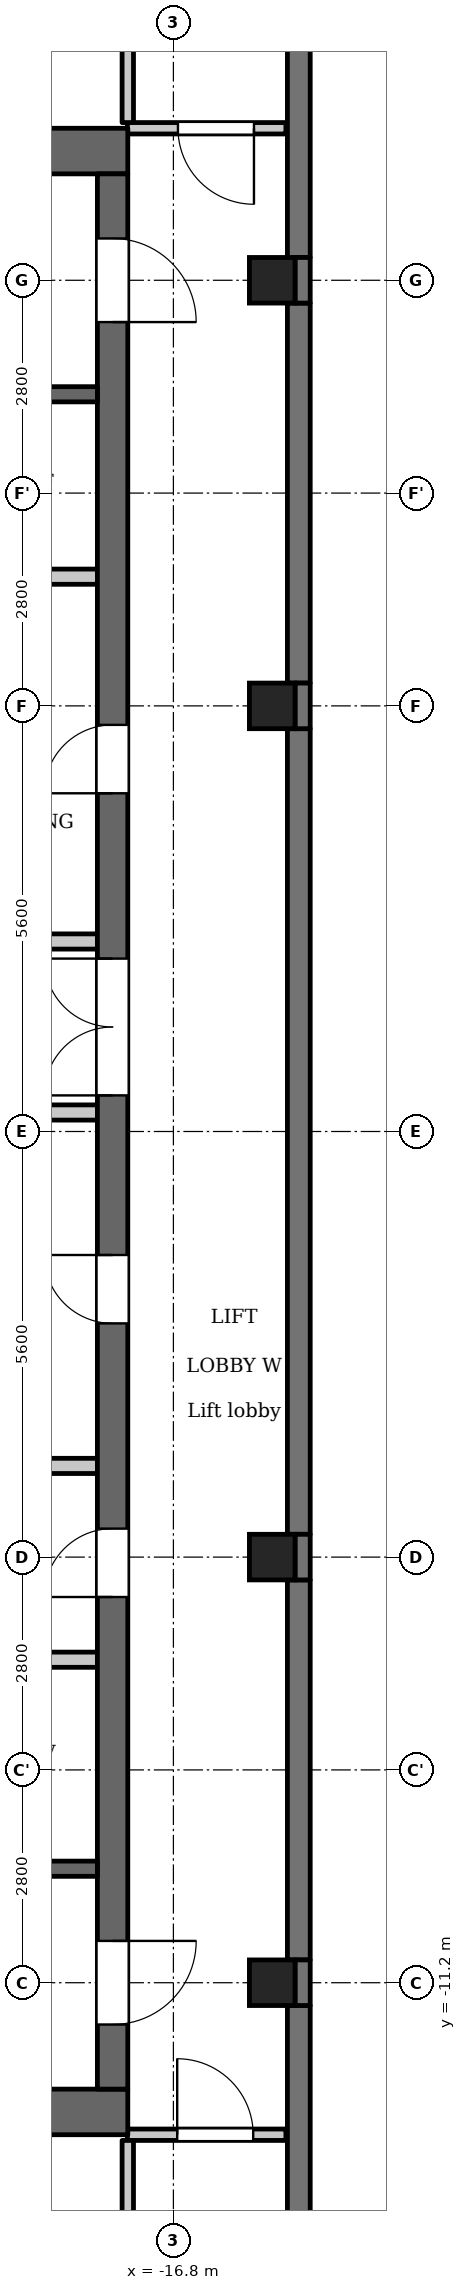
"""IFC4 building model, lengths in metres.
Left out: names, types, materials, properties, quantities, classifications, styles, units other than length and angle.
Written with IfcOpenShell. Run it as: python <this file> out.ifc"""

import sys

from ifc_helpers import new_model, si_unit, direction, frame, frame_2d, origin, origin_2d, place, context, subcontext, project, spatial, polyline, rectangle, outline, extrude, element, fill, save


model = new_model("IFC4")
c1 = context("Model", 3, precision=1e-05, world=origin(), true_north=direction((0.0, 1.0)))
c2 = subcontext(c1, "Body", "Model", "MODEL_VIEW")
j1 = project(units=[si_unit("LENGTHUNIT", "METRE"), si_unit("PLANEANGLEUNIT", "RADIAN")], contexts=[c1])
p1 = place(None, origin())
s1 = spatial("IfcSite", under=j1, at=p1, CompositionType="ELEMENT")
p2 = place(p1, origin())
s2 = spatial("IfcBuilding", under=s1, at=p2, CompositionType="ELEMENT")
p3 = place(p2, frame((0.0, 0.0, 310.4)))
s3 = spatial("IfcBuildingStorey", under=s2, at=p3, CompositionType="ELEMENT", Elevation=310.4)
for number, where, z_axis, x_axis in (
    (1, (-15.5, -11.2, 0.0), (0.0, 0.0, 1.0), (1.0, 0.0, 0.0)),
    (2, (-15.5, -5.6, 0.0), (0.0, 0.0, 1.0), (1.0, 0.0, 0.0)),
    (3, (-15.5, 5.6, 0.0), (0.0, 0.0, 1.0), (1.0, 0.0, 0.0)),
    (4, (-15.5, 11.2, 0.0), (0.0, 0.0, 1.0), (1.0, 0.0, 0.0)),
):
    element("IfcColumn", number, at=place(p3, frame(where, z_axis=z_axis, x_axis=x_axis)), inside=s3, PredefinedType="COLUMN", context=c2, shape_type="SweptSolid", body=[
        extrude(rectangle(XDim=0.6, YDim=0.6, at=origin_2d()), origin(), (0.0, 0.0, 1.0), 3.5),
    ])
p4 = place(p3, frame((-15.15, -18.8, 0.0), z_axis=(0.0, 0.0, 1.0), x_axis=(0.0, 1.0, 0.0)))
e5 = element("IfcWall", 5, at=p4, inside=s3, PredefinedType="SOLIDWALL", context=c2, shape_type="SweptSolid", body=[
    extrude(rectangle(XDim=7.3, YDim=0.3, at=frame_2d((3.65, 0.0))), origin(), (0.0, 0.0, 1.0), 2.8),
])
p5 = place(p4, frame((1.863, 0.0, 0.9)))
e6 = element("IfcOpeningElement", 6, at=p5, cuts=e5, PredefinedType="OPENING", context=c2, shape_type="SweptSolid", body=[
    extrude(rectangle(XDim=1.8, YDim=1.25, at=frame_2d((0.9, 0.625))), frame((0.0, 0.16, 0.0), z_axis=(0.0, -1.0, 0.0), x_axis=(1.0, 0.0, 0.0)), (0.0, 0.0, 1.0), 0.32),
])
p6 = place(p3, frame((-15.15, -10.9, 0.0), z_axis=(0.0, 0.0, 1.0), x_axis=(0.0, 1.0, 0.0)))
e7 = element("IfcWall", 7, at=p6, inside=s3, PredefinedType="SOLIDWALL", context=c2, shape_type="SweptSolid", body=[
    extrude(rectangle(XDim=5.0, YDim=0.3, at=frame_2d((2.5, 0.0))), origin(), (0.0, 0.0, 1.0), 2.8),
])
p7 = place(p3, frame((-15.15, -5.3, 0.0), z_axis=(0.0, 0.0, 1.0), x_axis=(0.0, 1.0, 0.0)))
e8 = element("IfcWall", 8, at=p7, inside=s3, PredefinedType="SOLIDWALL", context=c2, shape_type="SweptSolid", body=[
    extrude(rectangle(XDim=10.6, YDim=0.3, at=frame_2d((5.3, 0.0))), origin(), (0.0, 0.0, 1.0), 2.8),
])
p8 = place(p3, frame((-15.15, 5.9, 0.0), z_axis=(0.0, 0.0, 1.0), x_axis=(0.0, 1.0, 0.0)))
e9 = element("IfcWall", 9, at=p8, inside=s3, PredefinedType="SOLIDWALL", context=c2, shape_type="SweptSolid", body=[
    extrude(rectangle(XDim=5.0, YDim=0.3, at=frame_2d((2.5, 0.0))), origin(), (0.0, 0.0, 1.0), 2.8),
])
p9 = place(p3, frame((-15.15, 11.5, 0.0), z_axis=(0.0, 0.0, 1.0), x_axis=(0.0, 1.0, 0.0)))
e10 = element("IfcWall", 10, at=p9, inside=s3, PredefinedType="SOLIDWALL", context=c2, shape_type="SweptSolid", body=[
    extrude(rectangle(XDim=7.3, YDim=0.3, at=frame_2d((3.65, 0.0))), origin(), (0.0, 0.0, 1.0), 2.8),
])
p10 = place(p9, frame((3.637, 0.0, 0.9)))
e11 = element("IfcOpeningElement", 11, at=p10, cuts=e10, PredefinedType="OPENING", context=c2, shape_type="SweptSolid", body=[
    extrude(rectangle(XDim=1.8, YDim=1.25, at=frame_2d((0.9, 0.625))), frame((0.0, 0.16, 0.0), z_axis=(0.0, -1.0, 0.0), x_axis=(1.0, 0.0, 0.0)), (0.0, 0.0, 1.0), 0.32),
])
for number, where, z_axis, x_axis in (
    (12, (-17.4, 12.9, 0.0), (0.0, 0.0, 1.0), (-1.0, 0.0, 0.0)),
    (13, (-17.4, -12.9, 0.0), (0.0, 0.0, 1.0), (-1.0, 0.0, 0.0)),
):
    element("IfcWall", number, at=place(p3, frame(where, z_axis=z_axis, x_axis=x_axis)), inside=s3, PredefinedType="SHEAR", context=c2, shape_type="SweptSolid", body=[
        extrude(rectangle(XDim=7.6, YDim=0.6, at=frame_2d((3.8, 0.0))), origin(), (0.0, 0.0, 1.0), 2.8),
    ])
p11 = place(p3, frame((-17.8, -4.4, 0.0), z_axis=(0.0, 0.0, 1.0), x_axis=(-1.0, 0.0, 0.0)))
e14 = element("IfcWall", 14, at=p11, inside=s3, PredefinedType="PARTITIONING", context=c2, shape_type="SweptSolid", body=[
    extrude(rectangle(XDim=2.8, YDim=0.2, at=frame_2d((1.4, 0.0))), origin(), (0.0, 0.0, 1.0), 2.8),
])
p12 = place(p3, frame((-17.6, -12.6, 0.0), z_axis=(0.0, 0.0, 1.0), x_axis=(0.0, 1.0, 0.0)))
e15 = element("IfcWall", 15, at=p12, inside=s3, PredefinedType="SHEAR", context=c2, shape_type="SweptSolid", body=[
    extrude(rectangle(XDim=25.2, YDim=0.4, at=frame_2d((12.6, 0.0))), origin(), (0.0, 0.0, 1.0), 2.8),
])
p13 = place(p12, frame((6.475, 0.0, 0.0)))
e16 = element("IfcOpeningElement", 16, at=p13, cuts=e15, PredefinedType="OPENING", context=c2, shape_type="SweptSolid", body=[
    extrude(rectangle(XDim=0.9, YDim=2.1, at=frame_2d((0.45, 1.05))), frame((0.0, 0.21, 0.0), z_axis=(0.0, -1.0, 0.0), x_axis=(1.0, 0.0, 0.0)), (0.0, 0.0, 1.0), 0.42),
])
p14 = place(p12, frame((10.075, 0.0, 0.0)))
e17 = element("IfcOpeningElement", 17, at=p14, cuts=e15, PredefinedType="OPENING", context=c2, shape_type="SweptSolid", body=[
    extrude(rectangle(XDim=0.9, YDim=2.1, at=frame_2d((0.45, 1.05))), frame((0.0, 0.21, 0.0), z_axis=(0.0, -1.0, 0.0), x_axis=(1.0, 0.0, 0.0)), (0.0, 0.0, 1.0), 0.42),
])
p15 = place(p12, frame((17.05, 0.0, 0.0)))
e18 = element("IfcOpeningElement", 18, at=p15, cuts=e15, PredefinedType="OPENING", context=c2, shape_type="SweptSolid", body=[
    extrude(rectangle(XDim=0.9, YDim=2.1, at=frame_2d((0.45, 1.05))), frame((0.0, 0.21, 0.0), z_axis=(0.0, -1.0, 0.0), x_axis=(1.0, 0.0, 0.0)), (0.0, 0.0, 1.0), 0.42),
])
p16 = place(p12, frame((23.25, 0.0, 0.0)))
e19 = element("IfcOpeningElement", 19, at=p16, cuts=e15, PredefinedType="OPENING", context=c2, shape_type="SweptSolid", body=[
    extrude(rectangle(XDim=1.1, YDim=2.1, at=frame_2d((0.55, 1.05))), frame((0.0, 0.21, 0.0), z_axis=(0.0, -1.0, 0.0), x_axis=(1.0, 0.0, 0.0)), (0.0, 0.0, 1.0), 0.42),
])
p17 = place(p12, frame((0.85, 0.0, 0.0)))
e20 = element("IfcOpeningElement", 20, at=p17, cuts=e15, PredefinedType="OPENING", context=c2, shape_type="SweptSolid", body=[
    extrude(rectangle(XDim=1.1, YDim=2.1, at=frame_2d((0.55, 1.05))), frame((0.0, 0.21, 0.0), z_axis=(0.0, -1.0, 0.0), x_axis=(1.0, 0.0, 0.0)), (0.0, 0.0, 1.0), 0.42),
])
p18 = place(p12, frame((13.075, 0.0, 0.0)))
e21 = element("IfcOpeningElement", 21, at=p18, cuts=e15, PredefinedType="OPENING", context=c2, shape_type="SweptSolid", body=[
    extrude(rectangle(XDim=1.8, YDim=2.1, at=frame_2d((0.9, 1.05))), frame((0.0, 0.21, 0.0), z_axis=(0.0, -1.0, 0.0), x_axis=(1.0, 0.0, 0.0)), (0.0, 0.0, 1.0), 0.42),
])
p19 = place(p3, frame((-17.8, -9.7, 0.0), z_axis=(0.0, 0.0, 1.0), x_axis=(-1.0, 0.0, 0.0)))
e22 = element("IfcWall", 22, at=p19, inside=s3, PredefinedType="SHEAR", context=c2, shape_type="SweptSolid", body=[
    extrude(rectangle(XDim=5.8, YDim=0.2, at=frame_2d((2.9, 0.0))), origin(), (0.0, 0.0, 1.0), 2.8),
])
p20 = place(p19, frame((0.85, 0.0, 0.0)))
e23 = element("IfcOpeningElement", 23, at=p20, cuts=e22, PredefinedType="OPENING", context=c2, shape_type="SweptSolid", body=[
    extrude(rectangle(XDim=1.1, YDim=2.1, at=frame_2d((0.55, 1.05))), frame((0.0, 0.11, 0.0), z_axis=(0.0, -1.0, 0.0), x_axis=(1.0, 0.0, 0.0)), (0.0, 0.0, 1.0), 0.22),
])
p21 = place(p19, frame((3.75, 0.0, 0.0)))
e24 = element("IfcOpeningElement", 24, at=p21, cuts=e22, PredefinedType="OPENING", context=c2, shape_type="SweptSolid", body=[
    extrude(rectangle(XDim=1.1, YDim=2.1, at=frame_2d((0.55, 1.05))), frame((0.0, 0.11, 0.0), z_axis=(0.0, -1.0, 0.0), x_axis=(1.0, 0.0, 0.0)), (0.0, 0.0, 1.0), 0.22),
])
p22 = place(p3, frame((-17.8, -6.95, 0.0), z_axis=(0.0, 0.0, 1.0), x_axis=(-1.0, 0.0, 0.0)))
e25 = element("IfcWall", 25, at=p22, inside=s3, PredefinedType="PARTITIONING", context=c2, shape_type="SweptSolid", body=[
    extrude(rectangle(XDim=2.8, YDim=0.2, at=frame_2d((1.4, 0.0))), origin(), (0.0, 0.0, 1.0), 2.8),
])
for number, where, z_axis, x_axis in (
    (26, (-17.8, 0.25, 0.0), (0.0, 0.0, 1.0), (-1.0, 0.0, 0.0)),
    (27, (-17.8, 2.5, 0.0), (0.0, 0.0, 1.0), (-1.0, 0.0, 0.0)),
):
    element("IfcWall", number, at=place(p3, frame(where, z_axis=z_axis, x_axis=x_axis)), inside=s3, PredefinedType="PARTITIONING", context=c2, shape_type="SweptSolid", body=[
        extrude(rectangle(XDim=3.0, YDim=0.2, at=frame_2d((1.5, 0.0))), origin(), (0.0, 0.0, 1.0), 2.8),
    ])
p23 = place(p3, frame((-17.8, 7.3, 0.0), z_axis=(0.0, 0.0, 1.0), x_axis=(-1.0, 0.0, 0.0)))
e28 = element("IfcWall", 28, at=p23, inside=s3, PredefinedType="PARTITIONING", context=c2, shape_type="SweptSolid", body=[
    extrude(rectangle(XDim=2.8, YDim=0.2, at=frame_2d((1.4, 0.0))), origin(), (0.0, 0.0, 1.0), 2.8),
])
p24 = place(p3, frame((-17.8, 9.7, 0.0), z_axis=(0.0, 0.0, 1.0), x_axis=(-1.0, 0.0, 0.0)))
e29 = element("IfcWall", 29, at=p24, inside=s3, PredefinedType="SHEAR", context=c2, shape_type="SweptSolid", body=[
    extrude(rectangle(XDim=5.8, YDim=0.2, at=frame_2d((2.9, 0.0))), origin(), (0.0, 0.0, 1.0), 2.8),
])
p25 = place(p24, frame((0.85, 0.0, 0.0)))
e30 = element("IfcOpeningElement", 30, at=p25, cuts=e29, PredefinedType="OPENING", context=c2, shape_type="SweptSolid", body=[
    extrude(rectangle(XDim=1.1, YDim=2.1, at=frame_2d((0.55, 1.05))), frame((0.0, 0.11, 0.0), z_axis=(0.0, -1.0, 0.0), x_axis=(1.0, 0.0, 0.0)), (0.0, 0.0, 1.0), 0.22),
])
p26 = place(p24, frame((3.75, 0.0, 0.0)))
e31 = element("IfcOpeningElement", 31, at=p26, cuts=e29, PredefinedType="OPENING", context=c2, shape_type="SweptSolid", body=[
    extrude(rectangle(XDim=1.1, YDim=2.1, at=frame_2d((0.55, 1.05))), frame((0.0, 0.11, 0.0), z_axis=(0.0, -1.0, 0.0), x_axis=(1.0, 0.0, 0.0)), (0.0, 0.0, 1.0), 0.22),
])
p27 = place(p3, frame((-17.405, -13.2, 0.0), z_axis=(0.0, 0.0, 1.0), x_axis=(1.0, 0.0, 0.0)))
e32 = element("IfcWall", 32, at=p27, inside=s3, PredefinedType="PARTITIONING", context=c2, shape_type="SweptSolid", body=[
    extrude(rectangle(XDim=2.085, YDim=0.15, at=frame_2d((1.042, 0.0))), origin(), (0.0, 0.0, 1.0), 2.8),
])
p28 = place(p27, frame((0.655, 0.0, 0.0)))
e33 = element("IfcOpeningElement", 33, at=p28, cuts=e32, PredefinedType="OPENING", context=c2, shape_type="SweptSolid", body=[
    extrude(rectangle(XDim=1.0, YDim=2.1, at=frame_2d((0.5, 1.05))), frame((0.0, 0.085, 0.0), z_axis=(0.0, -1.0, 0.0), x_axis=(1.0, 0.0, 0.0)), (0.0, 0.0, 1.0), 0.17),
])
p29 = place(p3, frame((-17.405, 13.2, 0.0), z_axis=(0.0, 0.0, 1.0), x_axis=(1.0, 0.0, 0.0)))
e34 = element("IfcWall", 34, at=p29, inside=s3, PredefinedType="PARTITIONING", context=c2, shape_type="SweptSolid", body=[
    extrude(rectangle(XDim=2.085, YDim=0.15, at=frame_2d((1.042, 0.0))), origin(), (0.0, 0.0, 1.0), 2.8),
])
p30 = place(p29, frame((0.665, 0.0, 0.0)))
e35 = element("IfcOpeningElement", 35, at=p30, cuts=e34, PredefinedType="OPENING", context=c2, shape_type="SweptSolid", body=[
    extrude(rectangle(XDim=1.0, YDim=2.1, at=frame_2d((0.5, 1.05))), frame((0.0, 0.085, 0.0), z_axis=(0.0, -1.0, 0.0), x_axis=(1.0, 0.0, 0.0)), (0.0, 0.0, 1.0), 0.17),
])
p31 = place(p3, frame((-17.4, -19.236, 0.0), z_axis=(0.0, 0.0, 1.0), x_axis=(0.0, 1.0, 0.0)))
e36 = element("IfcWall", 36, at=p31, inside=s3, PredefinedType="PARTITIONING", context=c2, shape_type="SweptSolid", body=[
    extrude(rectangle(XDim=5.961, YDim=0.15, at=frame_2d((2.981, 0.0))), origin(), (0.0, 0.0, 1.0), 2.8),
])
p32 = place(p31, frame((0.486, 0.0, 0.0)))
e37 = element("IfcOpeningElement", 37, at=p32, cuts=e36, PredefinedType="OPENING", context=c2, shape_type="SweptSolid", body=[
    extrude(rectangle(XDim=0.9, YDim=2.1, at=frame_2d((0.45, 1.05))), frame((0.0, 0.085, 0.0), z_axis=(0.0, -1.0, 0.0), x_axis=(1.0, 0.0, 0.0)), (0.0, 0.0, 1.0), 0.17),
])
p33 = place(p3, frame((-17.4, 13.275, 0.0), z_axis=(0.0, 0.0, 1.0), x_axis=(0.0, 1.0, 0.0)))
e38 = element("IfcWall", 38, at=p33, inside=s3, PredefinedType="PARTITIONING", context=c2, shape_type="SweptSolid", body=[
    extrude(rectangle(XDim=5.961, YDim=0.15, at=frame_2d((2.981, 0.0))), origin(), (0.0, 0.0, 1.0), 2.8),
])
p34 = place(p33, frame((1.145, 0.0, 0.0)))
e39 = element("IfcOpeningElement", 39, at=p34, cuts=e38, PredefinedType="OPENING", context=c2, shape_type="SweptSolid", body=[
    extrude(rectangle(XDim=0.9, YDim=2.1, at=frame_2d((0.45, 1.05))), frame((0.0, 0.085, 0.0), z_axis=(0.0, -1.0, 0.0), x_axis=(1.0, 0.0, 0.0)), (0.0, 0.0, 1.0), 0.17),
])
p35 = place(p3, origin())
e40 = element("IfcWall", 40, at=p35, inside=s3, PredefinedType="SOLIDWALL", context=c2, shape_type="SweptSolid", body=[
    extrude(outline(polyline([(-15.2, 10.9), (-15.0, 10.9), (-15.0, 11.5), (-15.2, 11.5), (-15.2, 10.9)])), origin(), (0.0, 0.0, 1.0), 2.8),
])
e41 = element("IfcWall", 41, at=p35, inside=s3, PredefinedType="SOLIDWALL", context=c2, shape_type="SweptSolid", body=[
    extrude(outline(polyline([(-15.2, 5.3), (-15.0, 5.3), (-15.0, 5.9), (-15.3, 5.9), (-15.2, 5.9), (-15.2, 5.3)])), origin(), (0.0, 0.0, 1.0), 2.8),
])
e42 = element("IfcWall", 42, at=p35, inside=s3, PredefinedType="SOLIDWALL", context=c2, shape_type="SweptSolid", body=[
    extrude(outline(polyline([(-15.3, -5.9), (-15.0, -5.9), (-15.0, -5.3), (-15.3, -5.3), (-15.2, -5.3), (-15.2, -5.9), (-15.3, -5.9)])), origin(), (0.0, 0.0, 1.0), 2.8),
])
e43 = element("IfcWall", 43, at=p35, inside=s3, PredefinedType="SOLIDWALL", context=c2, shape_type="SweptSolid", body=[
    extrude(outline(polyline([(-15.2, -11.5), (-15.0, -11.5), (-15.0, -10.9), (-15.2, -10.9), (-15.2, -11.5)])), origin(), (0.0, 0.0, 1.0), 2.8),
])
p36 = place(p13, origin())
e44 = element("IfcDoor", 44, at=p36, inside=s3, OperationType="SINGLE_SWING_RIGHT", PredefinedType="DOOR", context=c2, shape_type="SweptSolid", body=[
    extrude(rectangle(XDim=0.9, YDim=2.1, at=frame_2d((0.45, 1.05))), frame((0.0, 0.025, 0.0), z_axis=(0.0, -1.0, 0.0), x_axis=(1.0, 0.0, 0.0)), (0.0, 0.0, 1.0), 0.05),
])
fill(e16, e44)
p37 = place(p14, origin())
e45 = element("IfcDoor", 45, at=p37, inside=s3, OperationType="SINGLE_SWING_LEFT", PredefinedType="DOOR", context=c2, shape_type="SweptSolid", body=[
    extrude(rectangle(XDim=0.9, YDim=2.1, at=frame_2d((0.45, 1.05))), frame((0.0, 0.025, 0.0), z_axis=(0.0, -1.0, 0.0), x_axis=(1.0, 0.0, 0.0)), (0.0, 0.0, 1.0), 0.05),
])
fill(e17, e45)
p38 = place(p15, origin())
e46 = element("IfcDoor", 46, at=p38, inside=s3, OperationType="SINGLE_SWING_RIGHT", PredefinedType="DOOR", context=c2, shape_type="SweptSolid", body=[
    extrude(rectangle(XDim=0.9, YDim=2.1, at=frame_2d((0.45, 1.05))), frame((0.0, 0.025, 0.0), z_axis=(0.0, -1.0, 0.0), x_axis=(1.0, 0.0, 0.0)), (0.0, 0.0, 1.0), 0.05),
])
fill(e18, e46)
p39 = place(p16, origin())
e47 = element("IfcDoor", 47, at=p39, inside=s3, OperationType="SINGLE_SWING_LEFT", PredefinedType="DOOR", context=c2, shape_type="SweptSolid", body=[
    extrude(rectangle(XDim=1.1, YDim=2.1, at=frame_2d((0.55, 1.05))), frame((0.0, 0.025, 0.0), z_axis=(0.0, -1.0, 0.0), x_axis=(1.0, 0.0, 0.0)), (0.0, 0.0, 1.0), 0.05),
])
fill(e19, e47)
p40 = place(p17, origin())
e48 = element("IfcDoor", 48, at=p40, inside=s3, OperationType="SINGLE_SWING_RIGHT", PredefinedType="DOOR", context=c2, shape_type="SweptSolid", body=[
    extrude(rectangle(XDim=1.1, YDim=2.1, at=frame_2d((0.55, 1.05))), frame((0.0, 0.025, 0.0), z_axis=(0.0, -1.0, 0.0), x_axis=(1.0, 0.0, 0.0)), (0.0, 0.0, 1.0), 0.05),
])
fill(e20, e48)
p41 = place(p18, origin())
e49 = element("IfcDoor", 49, at=p41, inside=s3, OperationType="DOUBLE_DOOR_SINGLE_SWING", PredefinedType="DOOR", context=c2, shape_type="SweptSolid", body=[
    extrude(rectangle(XDim=1.8, YDim=2.1, at=frame_2d((0.9, 1.05))), frame((0.0, 0.025, 0.0), z_axis=(0.0, -1.0, 0.0), x_axis=(1.0, 0.0, 0.0)), (0.0, 0.0, 1.0), 0.05),
])
fill(e21, e49)
p42 = place(p30, origin())
e50 = element("IfcDoor", 50, at=p42, inside=s3, OperationType="SINGLE_SWING_RIGHT", PredefinedType="DOOR", context=c2, shape_type="SweptSolid", body=[
    extrude(rectangle(XDim=1.0, YDim=2.1, at=frame_2d((0.5, 1.05))), frame((0.0, 0.025, 0.0), z_axis=(0.0, -1.0, 0.0), x_axis=(1.0, 0.0, 0.0)), (0.0, 0.0, 1.0), 0.05),
])
fill(e35, e50)
p43 = place(p28, origin())
e51 = element("IfcDoor", 51, at=p43, inside=s3, OperationType="SINGLE_SWING_RIGHT", PredefinedType="DOOR", context=c2, shape_type="SweptSolid", body=[
    extrude(rectangle(XDim=1.0, YDim=2.1, at=frame_2d((0.5, 1.05))), frame((0.0, 0.025, 0.0), z_axis=(0.0, -1.0, 0.0), x_axis=(1.0, 0.0, 0.0)), (0.0, 0.0, 1.0), 0.05),
])
fill(e33, e51)
save(model, sys.argv[1])
